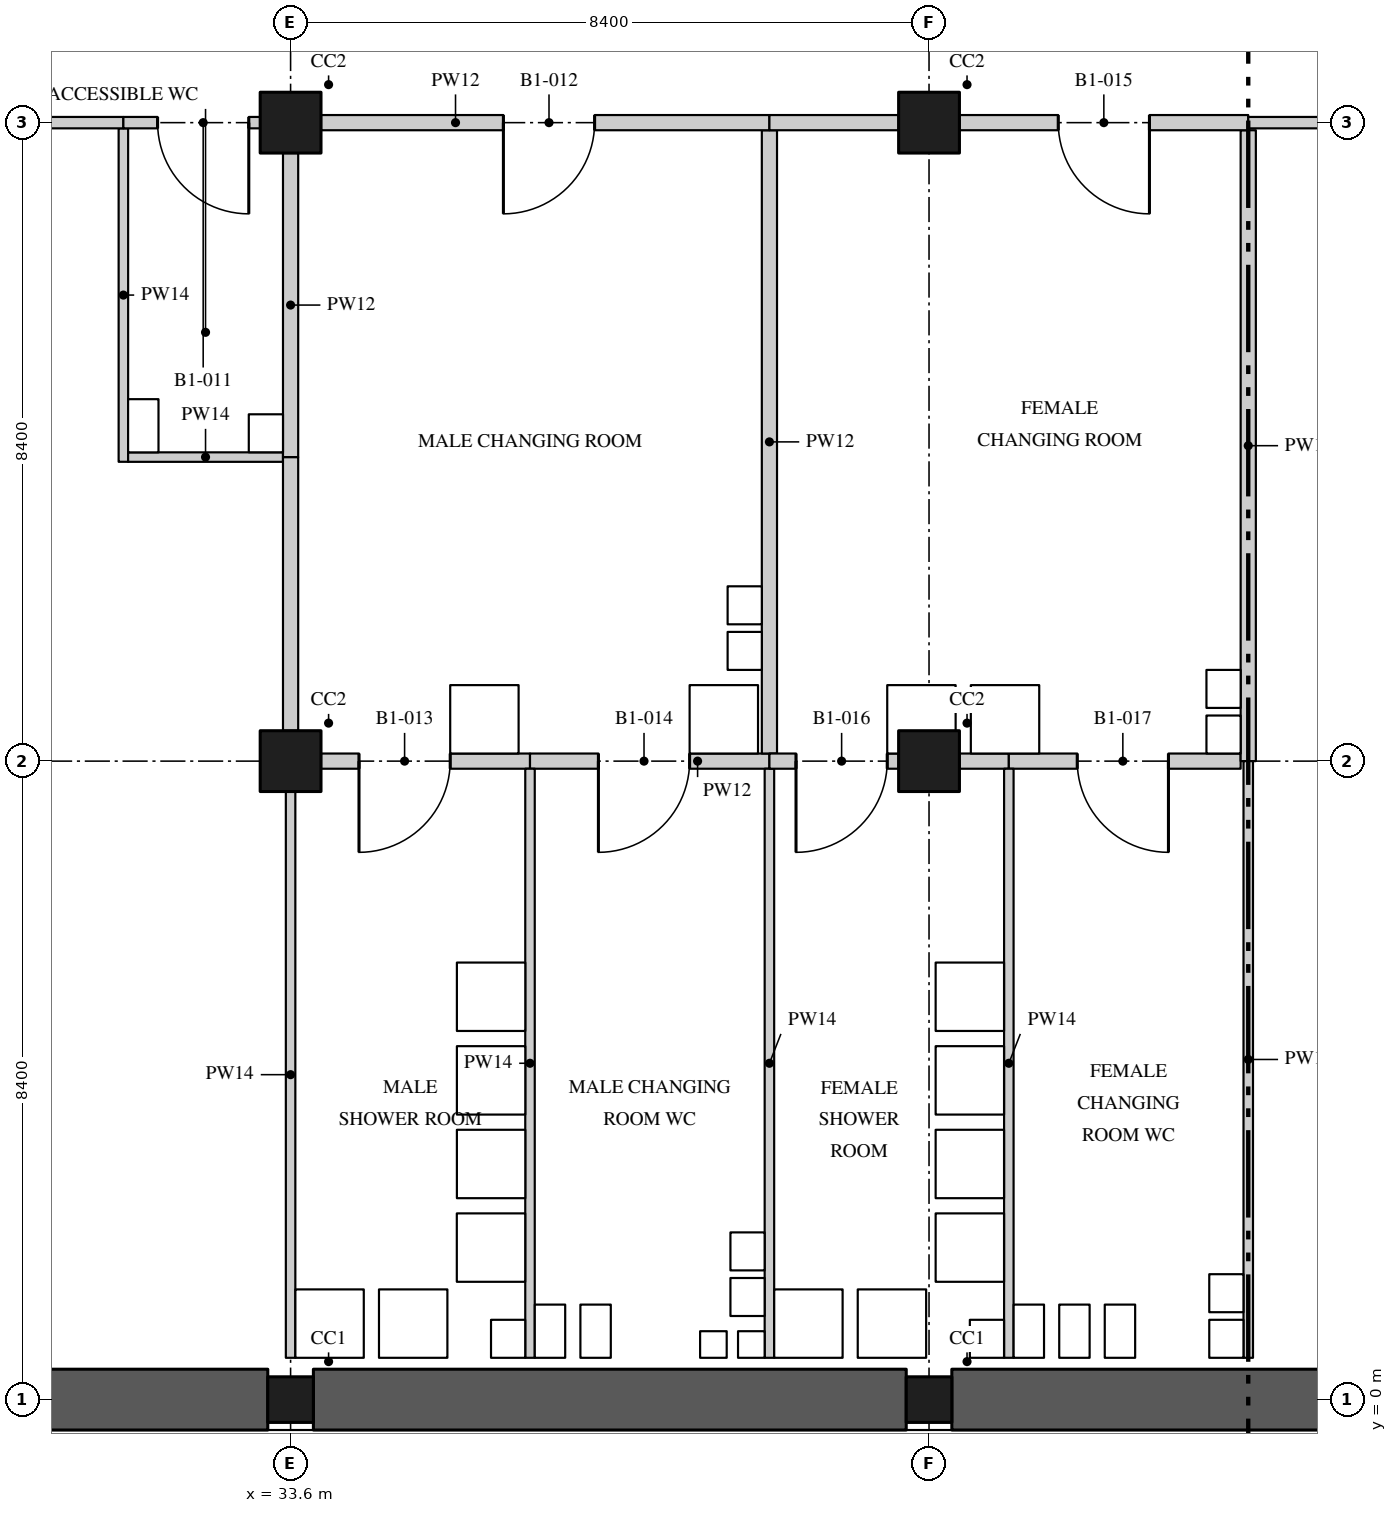
"""IFC4 building model, lengths in metres.
Left out: names, types, materials, properties, quantities, classifications, styles, units other than length and angle.
Written with IfcOpenShell. Run it as: python <this file> out.ifc"""

import sys

from ifc_helpers import new_model, si_unit, direction, frame, frame_2d, origin, origin_2d, place, context, subcontext, project, spatial, rectangle, extrude, element, fill, save


model = new_model("IFC4")
c1 = context("Model", 3, precision=1e-05, world=origin(), true_north=direction((0.0, 1.0)))
c2 = subcontext(c1, "Body", "Model", "MODEL_VIEW")
j1 = project(units=[si_unit("LENGTHUNIT", "METRE"), si_unit("PLANEANGLEUNIT", "RADIAN")], contexts=[c1])
p1 = place(None, origin())
s1 = spatial("IfcSite", under=j1, at=p1, CompositionType="ELEMENT")
p2 = place(p1, origin())
s2 = spatial("IfcBuilding", under=s1, at=p2, CompositionType="ELEMENT")
p3 = place(p2, frame((0.0, 0.0, -4.5)))
s3 = spatial("IfcBuildingStorey", under=s2, at=p3, CompositionType="ELEMENT", Elevation=-4.5)
p4 = place(p3, frame((33.6, 0.0, 0.0), z_axis=(0.0, 0.0, 1.0), x_axis=(1.0, 0.0, 0.0)))
e1 = element("IfcColumn", 1, at=p4, inside=s3, PredefinedType="COLUMN", context=c2, shape_type="SweptSolid", body=[
    extrude(rectangle(XDim=0.6, YDim=0.6, at=origin_2d()), origin(), (0.0, 0.0, 1.0), 4.05),
])
for number, where, z_axis, x_axis in (
    (2, (33.6, 8.4, 0.0), (0.0, 0.0, 1.0), (1.0, 0.0, 0.0)),
    (3, (33.6, 16.8, 0.0), (0.0, 0.0, 1.0), (1.0, 0.0, 0.0)),
):
    element("IfcColumn", number, at=place(p3, frame(where, z_axis=z_axis, x_axis=x_axis)), inside=s3, PredefinedType="COLUMN", context=c2, shape_type="SweptSolid", body=[
        extrude(rectangle(XDim=0.8, YDim=0.8, at=origin_2d()), origin(), (0.0, 0.0, 1.0), 4.05),
    ])
p5 = place(p3, frame((42.0, 0.0, 0.0), z_axis=(0.0, 0.0, 1.0), x_axis=(1.0, 0.0, 0.0)))
e4 = element("IfcColumn", 4, at=p5, inside=s3, PredefinedType="COLUMN", context=c2, shape_type="SweptSolid", body=[
    extrude(rectangle(XDim=0.6, YDim=0.6, at=origin_2d()), origin(), (0.0, 0.0, 1.0), 4.05),
])
for number, where, z_axis, x_axis in (
    (5, (42.0, 8.4, 0.0), (0.0, 0.0, 1.0), (1.0, 0.0, 0.0)),
    (6, (42.0, 16.8, 0.0), (0.0, 0.0, 1.0), (1.0, 0.0, 0.0)),
):
    element("IfcColumn", number, at=place(p3, frame(where, z_axis=z_axis, x_axis=x_axis)), inside=s3, PredefinedType="COLUMN", context=c2, shape_type="SweptSolid", body=[
        extrude(rectangle(XDim=0.8, YDim=0.8, at=origin_2d()), origin(), (0.0, 0.0, 1.0), 4.05),
    ])
for number, where, z_axis, x_axis in (
    (7, (25.5, 0.0, 0.0), (0.0, 0.0, 1.0), (1.0, 0.0, 0.0)),
    (8, (33.9, 0.0, 0.0), (0.0, 0.0, 1.0), (1.0, 0.0, 0.0)),
    (9, (42.3, 0.0, 0.0), (0.0, 0.0, 1.0), (1.0, 0.0, 0.0)),
):
    element("IfcWall", number, at=place(p3, frame(where, z_axis=z_axis, x_axis=x_axis)), inside=s3, PredefinedType="SOLIDWALL", context=c2, shape_type="SweptSolid", body=[
        extrude(rectangle(XDim=7.8, YDim=0.8, at=frame_2d((3.9, 0.0))), origin(), (0.0, 0.0, 1.0), 4.05),
    ])
p6 = place(p3, frame((31.4, 12.338, 0.0), z_axis=(0.0, 0.0, 1.0), x_axis=(0.0, 1.0, 0.0)))
e10 = element("IfcWall", 10, at=p6, inside=s3, PredefinedType="PARTITIONING", context=c2, shape_type="SweptSolid", body=[
    extrude(rectangle(XDim=4.387, YDim=0.125, at=frame_2d((2.194, 0.0))), origin(), (0.0, 0.0, 1.0), 4.05),
])
p7 = place(p3, frame((31.462, 12.4, 0.0), z_axis=(0.0, 0.0, 1.0), x_axis=(1.0, 0.0, 0.0)))
e11 = element("IfcWall", 11, at=p7, inside=s3, PredefinedType="PARTITIONING", context=c2, shape_type="SweptSolid", body=[
    extrude(rectangle(XDim=2.038, YDim=0.125, at=frame_2d((1.019, 0.0))), origin(), (0.0, 0.0, 1.0), 4.05),
])
p8 = place(p3, frame((33.6, 8.8, 0.0), z_axis=(0.0, 0.0, 1.0), x_axis=(0.0, 1.0, 0.0)))
e12 = element("IfcWall", 12, at=p8, inside=s3, PredefinedType="PARTITIONING", context=c2, shape_type="SweptSolid", body=[
    extrude(rectangle(XDim=3.6, YDim=0.2, at=frame_2d((1.8, 0.0))), origin(), (0.0, 0.0, 1.0), 4.05),
])
p9 = place(p3, frame((33.6, 0.55, 0.0), z_axis=(0.0, 0.0, 1.0), x_axis=(0.0, 1.0, 0.0)))
e13 = element("IfcWall", 13, at=p9, inside=s3, PredefinedType="PARTITIONING", context=c2, shape_type="SweptSolid", body=[
    extrude(rectangle(XDim=7.45, YDim=0.125, at=frame_2d((3.725, 0.0))), origin(), (0.0, 0.0, 1.0), 4.05),
])
p10 = place(p3, frame((25.6, 16.8, 0.0), z_axis=(0.0, 0.0, 1.0), x_axis=(1.0, 0.0, 0.0)))
e14 = element("IfcWall", 14, at=p10, inside=s3, PredefinedType="PARTITIONING", context=c2, shape_type="SweptSolid", body=[
    extrude(rectangle(XDim=5.8, YDim=0.15, at=frame_2d((2.9, 0.0))), origin(), (0.0, 0.0, 1.0), 4.05),
])
p11 = place(p10, frame((1.8, 0.0, 0.0)))
e15 = element("IfcOpeningElement", 15, at=p11, cuts=e14, PredefinedType="OPENING", context=c2, shape_type="SweptSolid", body=[
    extrude(rectangle(XDim=1.2, YDim=2.1, at=frame_2d((0.6, 1.05))), frame((0.0, 0.085, 0.0), z_axis=(0.0, -1.0, 0.0), x_axis=(1.0, 0.0, 0.0)), (0.0, 0.0, 1.0), 0.17),
])
p12 = place(p3, frame((33.6, 12.4, 0.0), z_axis=(0.0, 0.0, 1.0), x_axis=(0.0, 1.0, 0.0)))
e16 = element("IfcWall", 16, at=p12, inside=s3, PredefinedType="PARTITIONING", context=c2, shape_type="SweptSolid", body=[
    extrude(rectangle(XDim=4.0, YDim=0.2, at=frame_2d((2.0, 0.0))), origin(), (0.0, 0.0, 1.0), 4.05),
])
p13 = place(p3, frame((31.4, 16.8, 0.0), z_axis=(0.0, 0.0, 1.0), x_axis=(1.0, 0.0, 0.0)))
e17 = element("IfcWall", 17, at=p13, inside=s3, PredefinedType="PARTITIONING", context=c2, shape_type="SweptSolid", body=[
    extrude(rectangle(XDim=1.8, YDim=0.15, at=frame_2d((0.9, 0.0))), origin(), (0.0, 0.0, 1.0), 4.05),
])
p14 = place(p13, frame((0.45, 0.0, 0.0)))
e18 = element("IfcOpeningElement", 18, at=p14, cuts=e17, PredefinedType="OPENING", context=c2, shape_type="SweptSolid", body=[
    extrude(rectangle(XDim=1.2, YDim=2.1, at=frame_2d((0.6, 1.05))), frame((0.0, 0.085, 0.0), z_axis=(0.0, -1.0, 0.0), x_axis=(1.0, 0.0, 0.0)), (0.0, 0.0, 1.0), 0.17),
])
p15 = place(p3, frame((34.0, 8.4, 0.0), z_axis=(0.0, 0.0, 1.0), x_axis=(1.0, 0.0, 0.0)))
e19 = element("IfcWall", 19, at=p15, inside=s3, PredefinedType="PARTITIONING", context=c2, shape_type="SweptSolid", body=[
    extrude(rectangle(XDim=2.75, YDim=0.2, at=frame_2d((1.375, 0.0))), origin(), (0.0, 0.0, 1.0), 4.05),
])
p16 = place(p15, frame((0.5, 0.0, 0.0)))
e20 = element("IfcOpeningElement", 20, at=p16, cuts=e19, PredefinedType="OPENING", context=c2, shape_type="SweptSolid", body=[
    extrude(rectangle(XDim=1.2, YDim=2.1, at=frame_2d((0.6, 1.05))), frame((0.0, 0.11, 0.0), z_axis=(0.0, -1.0, 0.0), x_axis=(1.0, 0.0, 0.0)), (0.0, 0.0, 1.0), 0.22),
])
p17 = place(p3, frame((36.75, 8.4, 0.0), z_axis=(0.0, 0.0, 1.0), x_axis=(1.0, 0.0, 0.0)))
e21 = element("IfcWall", 21, at=p17, inside=s3, PredefinedType="PARTITIONING", context=c2, shape_type="SweptSolid", body=[
    extrude(rectangle(XDim=3.15, YDim=0.2, at=frame_2d((1.575, 0.0))), origin(), (0.0, 0.0, 1.0), 4.05),
])
p18 = place(p17, frame((0.9, 0.0, 0.0)))
e22 = element("IfcOpeningElement", 22, at=p18, cuts=e21, PredefinedType="OPENING", context=c2, shape_type="SweptSolid", body=[
    extrude(rectangle(XDim=1.2, YDim=2.1, at=frame_2d((0.6, 1.05))), frame((0.0, 0.11, 0.0), z_axis=(0.0, -1.0, 0.0), x_axis=(1.0, 0.0, 0.0)), (0.0, 0.0, 1.0), 0.22),
])
p19 = place(p3, frame((39.9, 8.5, 0.0), z_axis=(0.0, 0.0, 1.0), x_axis=(0.0, 1.0, 0.0)))
e23 = element("IfcWall", 23, at=p19, inside=s3, PredefinedType="PARTITIONING", context=c2, shape_type="SweptSolid", body=[
    extrude(rectangle(XDim=8.2, YDim=0.2, at=frame_2d((4.1, 0.0))), origin(), (0.0, 0.0, 1.0), 4.05),
])
p20 = place(p3, frame((34.0, 16.8, 0.0), z_axis=(0.0, 0.0, 1.0), x_axis=(1.0, 0.0, 0.0)))
e24 = element("IfcWall", 24, at=p20, inside=s3, PredefinedType="PARTITIONING", context=c2, shape_type="SweptSolid", body=[
    extrude(rectangle(XDim=5.9, YDim=0.2, at=frame_2d((2.95, 0.0))), origin(), (0.0, 0.0, 1.0), 4.05),
])
p21 = place(p20, frame((2.4, 0.0, 0.0)))
e25 = element("IfcOpeningElement", 25, at=p21, cuts=e24, PredefinedType="OPENING", context=c2, shape_type="SweptSolid", body=[
    extrude(rectangle(XDim=1.2, YDim=2.1, at=frame_2d((0.6, 1.05))), frame((0.0, 0.11, 0.0), z_axis=(0.0, -1.0, 0.0), x_axis=(1.0, 0.0, 0.0)), (0.0, 0.0, 1.0), 0.22),
])
for number, where, z_axis, x_axis in (
    (26, (36.75, 0.55, 0.0), (0.0, 0.0, 1.0), (0.0, 1.0, 0.0)),
    (27, (39.9, 0.55, 0.0), (0.0, 0.0, 1.0), (0.0, 1.0, 0.0)),
):
    element("IfcWall", number, at=place(p3, frame(where, z_axis=z_axis, x_axis=x_axis)), inside=s3, PredefinedType="PARTITIONING", context=c2, shape_type="SweptSolid", body=[
        extrude(rectangle(XDim=7.75, YDim=0.125, at=frame_2d((3.875, 0.0))), origin(), (0.0, 0.0, 1.0), 4.05),
    ])
p22 = place(p3, frame((39.9, 8.4, 0.0), z_axis=(0.0, 0.0, 1.0), x_axis=(1.0, 0.0, 0.0)))
e28 = element("IfcWall", 28, at=p22, inside=s3, PredefinedType="PARTITIONING", context=c2, shape_type="SweptSolid", body=[
    extrude(rectangle(XDim=1.7, YDim=0.2, at=frame_2d((0.85, 0.0))), origin(), (0.0, 0.0, 1.0), 4.05),
])
p23 = place(p22, frame((0.35, 0.0, 0.0)))
e29 = element("IfcOpeningElement", 29, at=p23, cuts=e28, PredefinedType="OPENING", context=c2, shape_type="SweptSolid", body=[
    extrude(rectangle(XDim=1.2, YDim=2.1, at=frame_2d((0.6, 1.05))), frame((0.0, 0.11, 0.0), z_axis=(0.0, -1.0, 0.0), x_axis=(1.0, 0.0, 0.0)), (0.0, 0.0, 1.0), 0.22),
])
p24 = place(p3, frame((42.4, 8.4, 0.0), z_axis=(0.0, 0.0, 1.0), x_axis=(1.0, 0.0, 0.0)))
e30 = element("IfcWall", 30, at=p24, inside=s3, PredefinedType="PARTITIONING", context=c2, shape_type="SweptSolid", body=[
    extrude(rectangle(XDim=0.65, YDim=0.2, at=frame_2d((0.325, 0.0))), origin(), (0.0, 0.0, 1.0), 4.05),
])
p25 = place(p3, frame((43.05, 8.4, 0.0), z_axis=(0.0, 0.0, 1.0), x_axis=(1.0, 0.0, 0.0)))
e31 = element("IfcWall", 31, at=p25, inside=s3, PredefinedType="PARTITIONING", context=c2, shape_type="SweptSolid", body=[
    extrude(rectangle(XDim=3.05, YDim=0.2, at=frame_2d((1.525, 0.0))), origin(), (0.0, 0.0, 1.0), 4.05),
])
p26 = place(p25, frame((0.9, 0.0, 0.0)))
e32 = element("IfcOpeningElement", 32, at=p26, cuts=e31, PredefinedType="OPENING", context=c2, shape_type="SweptSolid", body=[
    extrude(rectangle(XDim=1.2, YDim=2.1, at=frame_2d((0.6, 1.05))), frame((0.0, 0.11, 0.0), z_axis=(0.0, -1.0, 0.0), x_axis=(1.0, 0.0, 0.0)), (0.0, 0.0, 1.0), 0.22),
])
p27 = place(p3, frame((46.2, 8.4, 0.0), z_axis=(0.0, 0.0, 1.0), x_axis=(0.0, 1.0, 0.0)))
e33 = element("IfcWall", 33, at=p27, inside=s3, PredefinedType="PARTITIONING", context=c2, shape_type="SweptSolid", body=[
    extrude(rectangle(XDim=8.3, YDim=0.2, at=frame_2d((4.15, 0.0))), origin(), (0.0, 0.0, 1.0), 4.05),
])
p28 = place(p3, frame((39.9, 16.8, 0.0), z_axis=(0.0, 0.0, 1.0), x_axis=(1.0, 0.0, 0.0)))
e34 = element("IfcWall", 34, at=p28, inside=s3, PredefinedType="PARTITIONING", context=c2, shape_type="SweptSolid", body=[
    extrude(rectangle(XDim=1.7, YDim=0.2, at=frame_2d((0.85, 0.0))), origin(), (0.0, 0.0, 1.0), 4.05),
])
p29 = place(p3, frame((42.4, 16.8, 0.0), z_axis=(0.0, 0.0, 1.0), x_axis=(1.0, 0.0, 0.0)))
e35 = element("IfcWall", 35, at=p29, inside=s3, PredefinedType="PARTITIONING", context=c2, shape_type="SweptSolid", body=[
    extrude(rectangle(XDim=3.8, YDim=0.2, at=frame_2d((1.9, 0.0))), origin(), (0.0, 0.0, 1.0), 4.05),
])
p30 = place(p29, frame((1.3, 0.0, 0.0)))
e36 = element("IfcOpeningElement", 36, at=p30, cuts=e35, PredefinedType="OPENING", context=c2, shape_type="SweptSolid", body=[
    extrude(rectangle(XDim=1.2, YDim=2.1, at=frame_2d((0.6, 1.05))), frame((0.0, 0.11, 0.0), z_axis=(0.0, -1.0, 0.0), x_axis=(1.0, 0.0, 0.0)), (0.0, 0.0, 1.0), 0.22),
])
p31 = place(p3, frame((43.05, 0.55, 0.0), z_axis=(0.0, 0.0, 1.0), x_axis=(0.0, 1.0, 0.0)))
e37 = element("IfcWall", 37, at=p31, inside=s3, PredefinedType="PARTITIONING", context=c2, shape_type="SweptSolid", body=[
    extrude(rectangle(XDim=7.75, YDim=0.125, at=frame_2d((3.875, 0.0))), origin(), (0.0, 0.0, 1.0), 4.05),
])
p32 = place(p3, frame((46.2, 0.55, 0.0), z_axis=(0.0, 0.0, 1.0), x_axis=(0.0, 1.0, 0.0)))
e38 = element("IfcWall", 38, at=p32, inside=s3, PredefinedType="PARTITIONING", context=c2, shape_type="SweptSolid", body=[
    extrude(rectangle(XDim=7.85, YDim=0.125, at=frame_2d((3.925, 0.0))), origin(), (0.0, 0.0, 1.0), 4.05),
])
p33 = place(p3, frame((46.2, 16.8, 0.0), z_axis=(0.0, 0.0, 1.0), x_axis=(1.0, 0.0, 0.0)))
e39 = element("IfcWall", 39, at=p33, inside=s3, PredefinedType="PARTITIONING", context=c2, shape_type="SweptSolid", body=[
    extrude(rectangle(XDim=4.0, YDim=0.15, at=frame_2d((2.0, 0.0))), origin(), (0.0, 0.0, 1.0), 4.05),
])
p34 = place(p33, frame((2.65, 0.0, 0.0)))
e40 = element("IfcOpeningElement", 40, at=p34, cuts=e39, PredefinedType="OPENING", context=c2, shape_type="SweptSolid", body=[
    extrude(rectangle(XDim=1.2, YDim=2.1, at=frame_2d((0.6, 1.05))), frame((0.0, 0.085, 0.0), z_axis=(0.0, -1.0, 0.0), x_axis=(1.0, 0.0, 0.0)), (0.0, 0.0, 1.0), 0.17),
])
p35 = place(p14, frame((1.2, 0.0, 0.0), z_axis=(0.0, 0.0, 1.0), x_axis=(-1.0, 0.0, 0.0)))
e41 = element("IfcDoor", 41, at=p35, inside=s3, OperationType="SINGLE_SWING_RIGHT", PredefinedType="DOOR", context=c2, shape_type="SweptSolid", body=[
    extrude(rectangle(XDim=1.2, YDim=2.1, at=frame_2d((0.6, 1.05))), frame((0.0, 0.03, 0.0), z_axis=(0.0, -1.0, 0.0), x_axis=(1.0, 0.0, 0.0)), (0.0, 0.0, 1.0), 0.06),
])
fill(e18, e41)
p36 = place(p21, frame((1.2, 0.0, 0.0), z_axis=(0.0, 0.0, 1.0), x_axis=(-1.0, 0.0, 0.0)))
e42 = element("IfcDoor", 42, at=p36, inside=s3, OperationType="SINGLE_SWING_LEFT", PredefinedType="DOOR", context=c2, shape_type="SweptSolid", body=[
    extrude(rectangle(XDim=1.2, YDim=2.1, at=frame_2d((0.6, 1.05))), frame((0.0, 0.035, 0.0), z_axis=(0.0, -1.0, 0.0), x_axis=(1.0, 0.0, 0.0)), (0.0, 0.0, 1.0), 0.07),
])
fill(e25, e42)
p37 = place(p16, frame((1.2, 0.0, 0.0), z_axis=(0.0, 0.0, 1.0), x_axis=(-1.0, 0.0, 0.0)))
e43 = element("IfcDoor", 43, at=p37, inside=s3, OperationType="SINGLE_SWING_LEFT", PredefinedType="DOOR", context=c2, shape_type="SweptSolid", body=[
    extrude(rectangle(XDim=1.2, YDim=2.1, at=frame_2d((0.6, 1.05))), frame((0.0, 0.035, 0.0), z_axis=(0.0, -1.0, 0.0), x_axis=(1.0, 0.0, 0.0)), (0.0, 0.0, 1.0), 0.07),
])
fill(e20, e43)
p38 = place(p18, frame((1.2, 0.0, 0.0), z_axis=(0.0, 0.0, 1.0), x_axis=(-1.0, 0.0, 0.0)))
e44 = element("IfcDoor", 44, at=p38, inside=s3, OperationType="SINGLE_SWING_LEFT", PredefinedType="DOOR", context=c2, shape_type="SweptSolid", body=[
    extrude(rectangle(XDim=1.2, YDim=2.1, at=frame_2d((0.6, 1.05))), frame((0.0, 0.035, 0.0), z_axis=(0.0, -1.0, 0.0), x_axis=(1.0, 0.0, 0.0)), (0.0, 0.0, 1.0), 0.07),
])
fill(e22, e44)
p39 = place(p30, frame((1.2, 0.0, 0.0), z_axis=(0.0, 0.0, 1.0), x_axis=(-1.0, 0.0, 0.0)))
e45 = element("IfcDoor", 45, at=p39, inside=s3, OperationType="SINGLE_SWING_RIGHT", PredefinedType="DOOR", context=c2, shape_type="SweptSolid", body=[
    extrude(rectangle(XDim=1.2, YDim=2.1, at=frame_2d((0.6, 1.05))), frame((0.0, 0.035, 0.0), z_axis=(0.0, -1.0, 0.0), x_axis=(1.0, 0.0, 0.0)), (0.0, 0.0, 1.0), 0.07),
])
fill(e36, e45)
p40 = place(p23, frame((1.2, 0.0, 0.0), z_axis=(0.0, 0.0, 1.0), x_axis=(-1.0, 0.0, 0.0)))
e46 = element("IfcDoor", 46, at=p40, inside=s3, OperationType="SINGLE_SWING_LEFT", PredefinedType="DOOR", context=c2, shape_type="SweptSolid", body=[
    extrude(rectangle(XDim=1.2, YDim=2.1, at=frame_2d((0.6, 1.05))), frame((0.0, 0.035, 0.0), z_axis=(0.0, -1.0, 0.0), x_axis=(1.0, 0.0, 0.0)), (0.0, 0.0, 1.0), 0.07),
])
fill(e29, e46)
p41 = place(p26, frame((1.2, 0.0, 0.0), z_axis=(0.0, 0.0, 1.0), x_axis=(-1.0, 0.0, 0.0)))
e47 = element("IfcDoor", 47, at=p41, inside=s3, OperationType="SINGLE_SWING_RIGHT", PredefinedType="DOOR", context=c2, shape_type="SweptSolid", body=[
    extrude(rectangle(XDim=1.2, YDim=2.1, at=frame_2d((0.6, 1.05))), frame((0.0, 0.035, 0.0), z_axis=(0.0, -1.0, 0.0), x_axis=(1.0, 0.0, 0.0)), (0.0, 0.0, 1.0), 0.07),
])
fill(e32, e47)
save(model, sys.argv[1])
